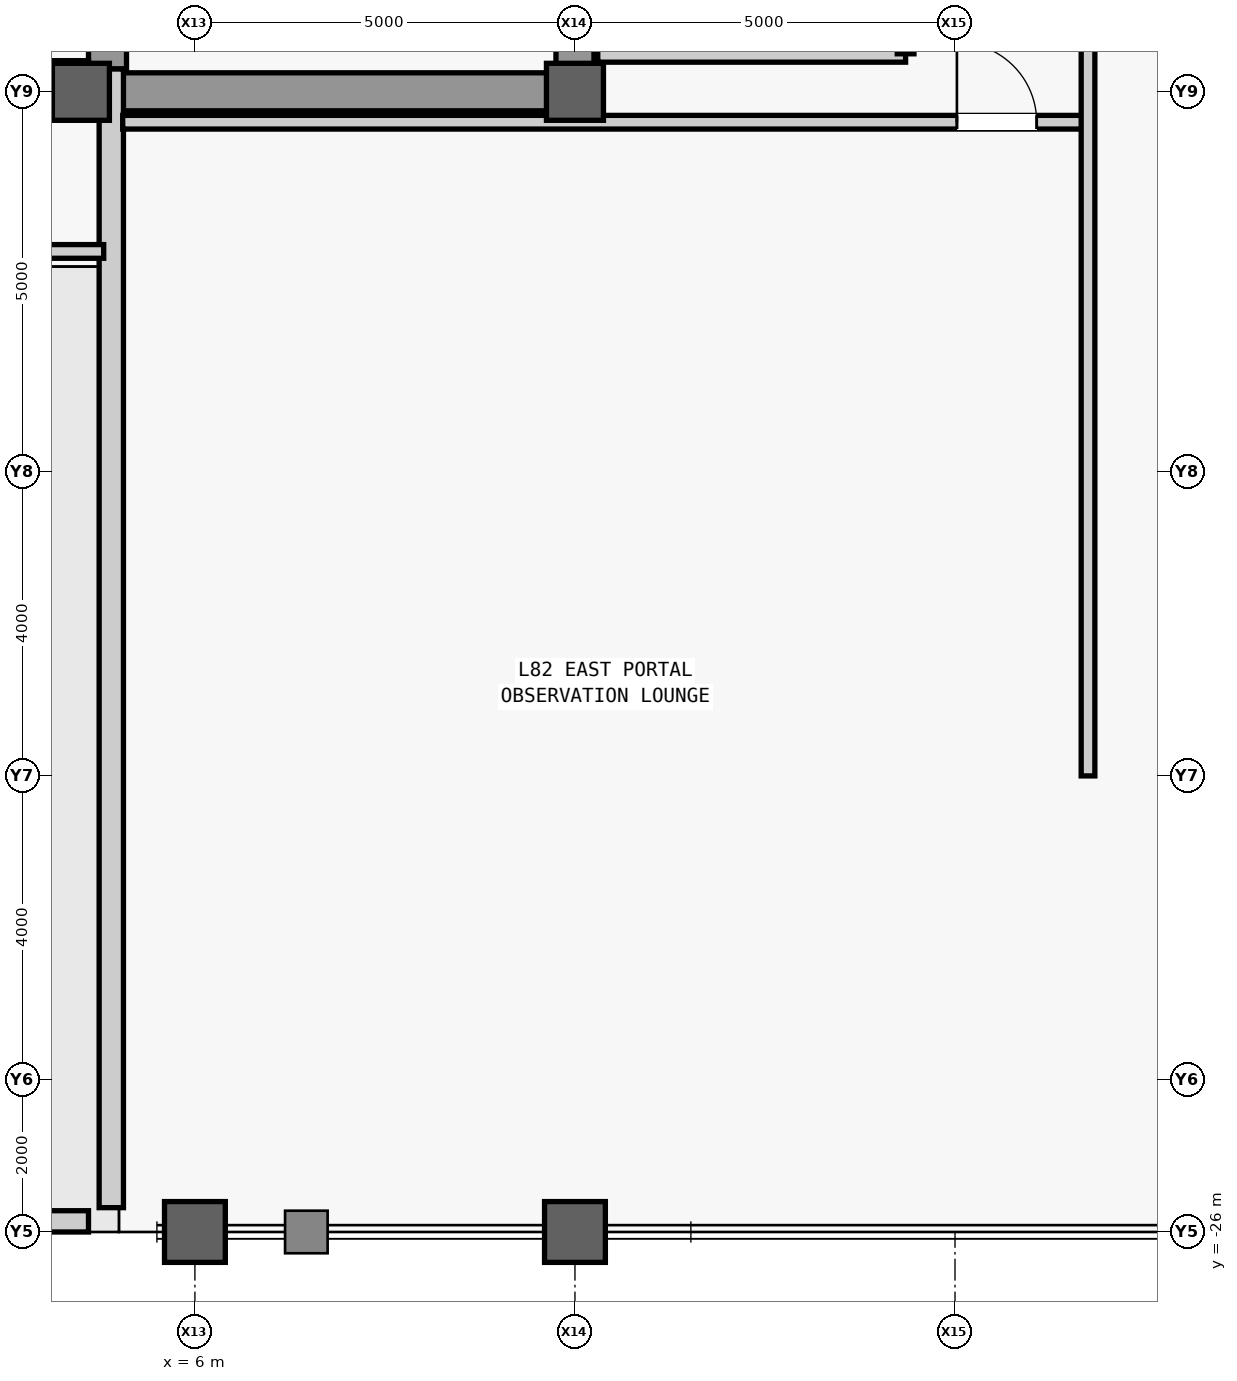
"""IFC4 building model, lengths in metres.
Left out: names, types, materials, properties, quantities, classifications, styles, units other than length and angle.
Written with IfcOpenShell. Run it as: python <this file> out.ifc"""

import sys

from ifc_helpers import new_model, si_unit, direction, frame, frame_2d, origin, origin_2d, place, context, subcontext, project, spatial, rectangle, hollow_rectangle, extrude, source, transform, mapped, element, fill, save


model = new_model("IFC4")
c1 = context("Model", 3, precision=1e-05, world=origin(), true_north=direction((0.0, 1.0)))
c2 = subcontext(c1, "Body", "Model", "MODEL_VIEW")
j1 = project(units=[si_unit("LENGTHUNIT", "METRE"), si_unit("PLANEANGLEUNIT", "RADIAN")], contexts=[c1])
p1 = place(None, origin())
s1 = spatial("IfcSite", under=j1, at=p1, CompositionType="ELEMENT")
p2 = place(p1, origin())
s2 = spatial("IfcBuilding", under=s1, at=p2, CompositionType="ELEMENT")
p3 = place(p2, frame((0.0, 0.0, 346.3)))
s3 = spatial("IfcBuildingStorey", under=s2, at=p3, CompositionType="ELEMENT", Elevation=346.3)
m1 = source(origin(), c2, "Body", "SweptSolid", [
    extrude(rectangle(XDim=22.0, YDim=0.5, at=frame_2d((11.0, 0.0))), origin(), (0.0, 0.0, 1.0), 3.74),
])
p4 = place(p3, frame((11.0, -11.0, 0.0), z_axis=(0.0, 0.0, 1.0), x_axis=(0.0, 1.0, 0.0)))
e1 = element("IfcWall", 1, at=p4, inside=s3, PredefinedType="SHEAR", context=c2, shape_type="MappedRepresentation", body=[
    mapped(m1, transform((0.0, 0.0, 0.0), scale=1.0)),
])
m2 = source(origin(), c2, "Body", "SweptSolid", [
    extrude(rectangle(XDim=1.1, YDim=2.2, at=frame_2d((0.55, 1.1))), frame((0.0, 0.26, 0.0), z_axis=(0.0, -1.0, 0.0), x_axis=(1.0, 0.0, 0.0)), (0.0, 0.0, 1.0), 0.52),
])
p5 = place(p4, frame((0.8, 0.0, 0.0)))
e2 = element("IfcOpeningElement", 2, at=p5, cuts=e1, PredefinedType="OPENING", context=c2, shape_type="MappedRepresentation", body=[
    mapped(m2, transform((0.0, 0.0, 0.0), scale=1.0)),
])
m3 = source(origin(), c2, "Body", "SweptSolid", [
    extrude(rectangle(XDim=0.9, YDim=2.15, at=frame_2d((0.45, 1.075))), frame((0.0, 0.26, 0.0), z_axis=(0.0, -1.0, 0.0), x_axis=(1.0, 0.0, 0.0)), (0.0, 0.0, 1.0), 0.52),
])
p6 = place(p4, frame((6.2, 0.0, 0.0)))
e3 = element("IfcOpeningElement", 3, at=p6, cuts=e1, PredefinedType="OPENING", context=c2, shape_type="MappedRepresentation", body=[
    mapped(m3, transform((0.0, 0.0, 0.0), scale=1.0)),
])
p7 = place(p4, frame((8.05, 0.0, 0.0)))
e4 = element("IfcOpeningElement", 4, at=p7, cuts=e1, PredefinedType="OPENING", context=c2, shape_type="MappedRepresentation", body=[
    mapped(m3, transform((0.0, 0.0, 0.0), scale=1.0)),
])
m4 = source(origin(), c2, "Body", "SweptSolid", [
    extrude(rectangle(XDim=1.2, YDim=2.3, at=frame_2d((0.6, 1.15))), frame((0.0, 0.26, 0.0), z_axis=(0.0, -1.0, 0.0), x_axis=(1.0, 0.0, 0.0)), (0.0, 0.0, 1.0), 0.52),
])
p8 = place(p4, frame((17.6, 0.0, 0.0)))
e5 = element("IfcOpeningElement", 5, at=p8, cuts=e1, PredefinedType="OPENING", context=c2, shape_type="MappedRepresentation", body=[
    mapped(m4, transform((0.0, 0.0, 0.0), scale=1.0)),
])
p9 = place(p4, frame((19.6, 0.0, 0.0)))
e6 = element("IfcOpeningElement", 6, at=p9, cuts=e1, PredefinedType="OPENING", context=c2, shape_type="MappedRepresentation", body=[
    mapped(m4, transform((0.0, 0.0, 0.0), scale=1.0)),
])
m5 = source(origin(), c2, "Body", "SweptSolid", [
    extrude(rectangle(XDim=1.3, YDim=2.3, at=frame_2d((0.65, 1.15))), frame((0.0, 0.26, 0.0), z_axis=(0.0, -1.0, 0.0), x_axis=(1.0, 0.0, 0.0)), (0.0, 0.0, 1.0), 0.52),
])
p10 = place(p4, frame((2.7, 0.0, 0.0)))
e7 = element("IfcOpeningElement", 7, at=p10, cuts=e1, PredefinedType="OPENING", context=c2, shape_type="MappedRepresentation", body=[
    mapped(m5, transform((0.0, 0.0, 0.0), scale=1.0)),
])
p11 = place(p4, frame((13.35, 0.0, 0.0)))
e8 = element("IfcOpeningElement", 8, at=p11, cuts=e1, PredefinedType="OPENING", context=c2, shape_type="MappedRepresentation", body=[
    mapped(m5, transform((0.0, 0.0, 0.0), scale=1.0)),
])
m6 = source(origin(), c2, "Body", "SweptSolid", [
    extrude(rectangle(XDim=21.4, YDim=0.5, at=frame_2d((10.7, 0.0))), origin(), (0.0, 0.0, 1.0), 3.74),
])
p12 = place(p3, frame((4.85, -10.7, 0.0), z_axis=(0.0, 0.0, 1.0), x_axis=(0.0, 1.0, 0.0)))
e9 = element("IfcWall", 9, at=p12, inside=s3, PredefinedType="SHEAR", context=c2, shape_type="MappedRepresentation", body=[
    mapped(m6, transform((0.0, 0.0, 0.0), scale=1.0)),
])
m7 = source(origin(), c2, "Body", "SweptSolid", [
    extrude(rectangle(XDim=5.9, YDim=0.5, at=frame_2d((2.95, 0.0))), origin(), (0.0, 0.0, 1.0), 3.74),
])
p13 = place(p3, frame((4.85, -11.0, 0.0), z_axis=(0.0, 0.0, 1.0), x_axis=(1.0, 0.0, 0.0)))
e10 = element("IfcWall", 10, at=p13, inside=s3, PredefinedType="SHEAR", context=c2, shape_type="MappedRepresentation", body=[
    mapped(m7, transform((0.0, 0.0, 0.0), scale=1.0)),
])
m8 = source(origin(), c2, "Body", "SweptSolid", [
    extrude(rectangle(XDim=0.75, YDim=0.75, at=origin_2d()), origin(), (0.0, 0.0, 1.0), 4.0),
])
p14 = place(p3, frame((4.5, -11.0, 0.0), z_axis=(0.0, 0.0, 1.0), x_axis=(1.0, 0.0, 0.0)))
e11 = element("IfcColumn", 11, at=p14, inside=s3, PredefinedType="COLUMN", context=c2, shape_type="MappedRepresentation", body=[
    mapped(m8, transform((0.0, 0.0, 0.0), scale=1.0)),
])
m9 = source(origin(), c2, "Body", "SweptSolid", [
    extrude(hollow_rectangle(XDim=0.8, YDim=0.8, WallThickness=0.045, at=origin_2d()), origin(), (0.0, 0.0, 1.0), 4.0),
])
for number, where, z_axis, x_axis in (
    (12, (6.0, -26.0, 0.0), (0.0, 0.0, 1.0), (1.0, 0.0, 0.0)),
    (13, (11.0, -26.0, 0.0), (0.0, 0.0, 1.0), (1.0, 0.0, 0.0)),
):
    element("IfcColumn", number, at=place(p3, frame(where, z_axis=z_axis, x_axis=x_axis)), inside=s3, PredefinedType="COLUMN", context=c2, shape_type="MappedRepresentation", body=[
        mapped(m9, transform((0.0, 0.0, 0.0), scale=1.0)),
    ])
p15 = place(p3, frame((11.0, -11.0, 0.0), z_axis=(0.0, 0.0, 1.0), x_axis=(1.0, 0.0, 0.0)))
e14 = element("IfcColumn", 14, at=p15, inside=s3, PredefinedType="COLUMN", context=c2, shape_type="MappedRepresentation", body=[
    mapped(m8, transform((0.0, 0.0, 0.0), scale=1.0)),
])
m10 = source(origin(), c2, "Body", "SweptSolid", [
    extrude(rectangle(XDim=9.2, YDim=0.28, at=frame_2d((4.6, 0.0))), origin(), (0.0, 0.0, 1.0), 1.2),
])
p16 = place(p3, frame((-4.6, -25.86, 0.0), z_axis=(0.0, 0.0, 1.0), x_axis=(1.0, 0.0, 0.0)))
e15 = element("IfcWall", 15, at=p16, inside=s3, PredefinedType="PARAPET", context=c2, shape_type="MappedRepresentation", body=[
    mapped(m10, transform((0.0, 0.0, 0.0), scale=1.0)),
])
m11 = source(origin(), c2, "Body", "SweptSolid", [
    extrude(rectangle(XDim=14.98, YDim=0.32, at=frame_2d((7.49, 0.0))), origin(), (0.0, 0.0, 1.0), 3.045),
])
p17 = place(p3, frame((4.9, -25.68, 0.0), z_axis=(0.0, 0.0, 1.0), x_axis=(0.0, 1.0, 0.0)))
e16 = element("IfcWall", 16, at=p17, inside=s3, PredefinedType="STANDARD", context=c2, shape_type="MappedRepresentation", body=[
    mapped(m11, transform((0.0, 0.0, 0.0), scale=1.0)),
])
m12 = source(origin(), c2, "Body", "SweptSolid", [
    extrude(rectangle(XDim=4.05, YDim=0.22, at=frame_2d((2.025, 0.0))), origin(), (0.0, 0.0, 1.0), 3.74),
])
p18 = place(p3, frame((11.3, -10.5, 0.0), z_axis=(0.0, 0.0, 1.0), x_axis=(1.0, 0.0, 0.0)))
e17 = element("IfcWall", 17, at=p18, inside=s3, PredefinedType="PARTITIONING", context=c2, shape_type="MappedRepresentation", body=[
    mapped(m12, transform((0.0, 0.0, 0.0), scale=1.0)),
])
m13 = source(origin(), c2, "Body", "SweptSolid", [
    extrude(rectangle(XDim=4.4, YDim=0.22, at=frame_2d((2.2, 0.0))), origin(), (0.0, 0.0, 1.0), 3.74),
])
p19 = place(p3, frame((15.35, -10.5, 0.0), z_axis=(0.0, 0.0, 1.0), x_axis=(0.0, 1.0, 0.0)))
e18 = element("IfcWall", 18, at=p19, inside=s3, PredefinedType="PARTITIONING", context=c2, shape_type="MappedRepresentation", body=[
    mapped(m13, transform((0.0, 0.0, 0.0), scale=1.0)),
])
m14 = source(origin(), c2, "Body", "SweptSolid", [
    extrude(rectangle(XDim=1.2, YDim=2.2, at=frame_2d((0.6, 1.1))), frame((0.0, 0.12, 0.0), z_axis=(0.0, -1.0, 0.0), x_axis=(1.0, 0.0, 0.0)), (0.0, 0.0, 1.0), 0.24),
])
p20 = place(p19, frame((1.6, 0.0, 0.0)))
e19 = element("IfcOpeningElement", 19, at=p20, cuts=e18, PredefinedType="OPENING", context=c2, shape_type="MappedRepresentation", body=[
    mapped(m14, transform((0.0, 0.0, 0.0), scale=1.0)),
])
m15 = source(origin(), c2, "Body", "SweptSolid", [
    extrude(rectangle(XDim=9.2, YDim=0.22, at=frame_2d((4.6, 0.0))), origin(), (0.0, 0.0, 1.0), 3.74),
])
p21 = place(p3, frame((-4.6, -10.7, 0.0), z_axis=(0.0, 0.0, 1.0), x_axis=(1.0, 0.0, 0.0)))
e20 = element("IfcWall", 20, at=p21, inside=s3, PredefinedType="PARTITIONING", context=c2, shape_type="MappedRepresentation", body=[
    mapped(m15, transform((0.0, 0.0, 0.0), scale=1.0)),
])
m16 = source(origin(), c2, "Body", "SweptSolid", [
    extrude(rectangle(XDim=0.95, YDim=2.15, at=frame_2d((0.475, 1.075))), frame((0.0, 0.12, 0.0), z_axis=(0.0, -1.0, 0.0), x_axis=(1.0, 0.0, 0.0)), (0.0, 0.0, 1.0), 0.24),
])
p22 = place(p21, frame((1.425, 0.0, 0.0)))
e21 = element("IfcOpeningElement", 21, at=p22, cuts=e20, PredefinedType="OPENING", context=c2, shape_type="MappedRepresentation", body=[
    mapped(m16, transform((0.0, 0.0, 0.0), scale=1.0)),
])
p23 = place(p21, frame((6.025, 0.0, 0.0)))
e22 = element("IfcOpeningElement", 22, at=p23, cuts=e20, PredefinedType="OPENING", context=c2, shape_type="MappedRepresentation", body=[
    mapped(m16, transform((0.0, 0.0, 0.0), scale=1.0)),
])
m17 = source(origin(), c2, "Body", "SweptSolid", [
    extrude(rectangle(XDim=22.55, YDim=0.18, at=frame_2d((11.275, 0.0))), origin(), (0.0, 0.0, 1.0), 3.74),
])
p24 = place(p3, frame((-17.75, -13.1, 0.0), z_axis=(0.0, 0.0, 1.0), x_axis=(1.0, 0.0, 0.0)))
e23 = element("IfcWall", 23, at=p24, inside=s3, PredefinedType="PARTITIONING", context=c2, shape_type="MappedRepresentation", body=[
    mapped(m17, transform((0.0, 0.0, 0.0), scale=1.0)),
])
m18 = source(origin(), c2, "Body", "SweptSolid", [
    extrude(rectangle(XDim=1.05, YDim=2.2, at=frame_2d((0.525, 1.1))), frame((0.0, 0.1, 0.0), z_axis=(0.0, -1.0, 0.0), x_axis=(1.0, 0.0, 0.0)), (0.0, 0.0, 1.0), 0.2),
])
p25 = place(p24, frame((0.675, 0.0, 0.0)))
e24 = element("IfcOpeningElement", 24, at=p25, cuts=e23, PredefinedType="OPENING", context=c2, shape_type="MappedRepresentation", body=[
    mapped(m18, transform((0.0, 0.0, 0.0), scale=1.0)),
])
m19 = source(origin(), c2, "Body", "SweptSolid", [
    extrude(rectangle(XDim=12.7, YDim=0.18, at=frame_2d((6.35, 0.0))), origin(), (0.0, 0.0, 1.0), 2.79),
])
p26 = place(p3, frame((5.05, -11.4, 0.0), z_axis=(0.0, 0.0, 1.0), x_axis=(1.0, 0.0, 0.0)))
e25 = element("IfcWall", 25, at=p26, inside=s3, PredefinedType="PARTITIONING", context=c2, shape_type="MappedRepresentation", body=[
    mapped(m19, transform((0.0, 0.0, 0.0), scale=1.0)),
])
p27 = place(p26, frame((10.975, 0.0, 0.0)))
e26 = element("IfcOpeningElement", 26, at=p27, cuts=e25, PredefinedType="OPENING", context=c2, shape_type="MappedRepresentation", body=[
    mapped(m18, transform((0.0, 0.0, 0.0), scale=1.0)),
])
m20 = source(origin(), c2, "Body", "SweptSolid", [
    extrude(rectangle(XDim=40.0, YDim=0.18, at=frame_2d((20.0, 0.0))), origin(), (0.0, 0.0, 1.0), 3.74),
])
p28 = place(p3, frame((17.75, -20.0, 0.0), z_axis=(0.0, 0.0, 1.0), x_axis=(0.0, 1.0, 0.0)))
e27 = element("IfcWall", 27, at=p28, inside=s3, PredefinedType="PARTITIONING", context=c2, shape_type="MappedRepresentation", body=[
    mapped(m20, transform((0.0, 0.0, 0.0), scale=1.0)),
])
m21 = source(origin(), c2, "Body", "SweptSolid", [
    extrude(rectangle(XDim=0.95, YDim=2.15, at=frame_2d((0.475, 1.075))), frame((0.0, 0.1, 0.0), z_axis=(0.0, -1.0, 0.0), x_axis=(1.0, 0.0, 0.0)), (0.0, 0.0, 1.0), 0.2),
])
p29 = place(p28, frame((11.161, 0.0, 0.0)))
e28 = element("IfcOpeningElement", 28, at=p29, cuts=e27, PredefinedType="OPENING", context=c2, shape_type="MappedRepresentation", body=[
    mapped(m21, transform((0.0, 0.0, 0.0), scale=1.0)),
])
p30 = place(p28, frame((16.789, 0.0, 0.0)))
e29 = element("IfcOpeningElement", 29, at=p30, cuts=e27, PredefinedType="OPENING", context=c2, shape_type="MappedRepresentation", body=[
    mapped(m21, transform((0.0, 0.0, 0.0), scale=1.0)),
])
p31 = place(p28, frame((22.945, 0.0, 0.0)))
e30 = element("IfcOpeningElement", 30, at=p31, cuts=e27, PredefinedType="OPENING", context=c2, shape_type="MappedRepresentation", body=[
    mapped(m21, transform((0.0, 0.0, 0.0), scale=1.0)),
])
p32 = place(p28, frame((28.967, 0.0, 0.0)))
e31 = element("IfcOpeningElement", 31, at=p32, cuts=e27, PredefinedType="OPENING", context=c2, shape_type="MappedRepresentation", body=[
    mapped(m21, transform((0.0, 0.0, 0.0), scale=1.0)),
])
m22 = source(origin(), c2, "Body", "SweptSolid", [
    extrude(rectangle(XDim=1.05, YDim=2.2, at=frame_2d((0.525, 1.1))), frame((0.0, 0.025, 0.0), z_axis=(0.0, -1.0, 0.0), x_axis=(1.0, 0.0, 0.0)), (0.0, 0.0, 1.0), 0.05),
])
p33 = place(p27, origin())
e32 = element("IfcDoor", 32, at=p33, inside=s3, OperationType="SINGLE_SWING_LEFT", PredefinedType="DOOR", context=c2, shape_type="MappedRepresentation", body=[
    mapped(m22, transform((0.0, 0.0, 0.0), scale=1.0)),
])
fill(e26, e32)
save(model, sys.argv[1])
